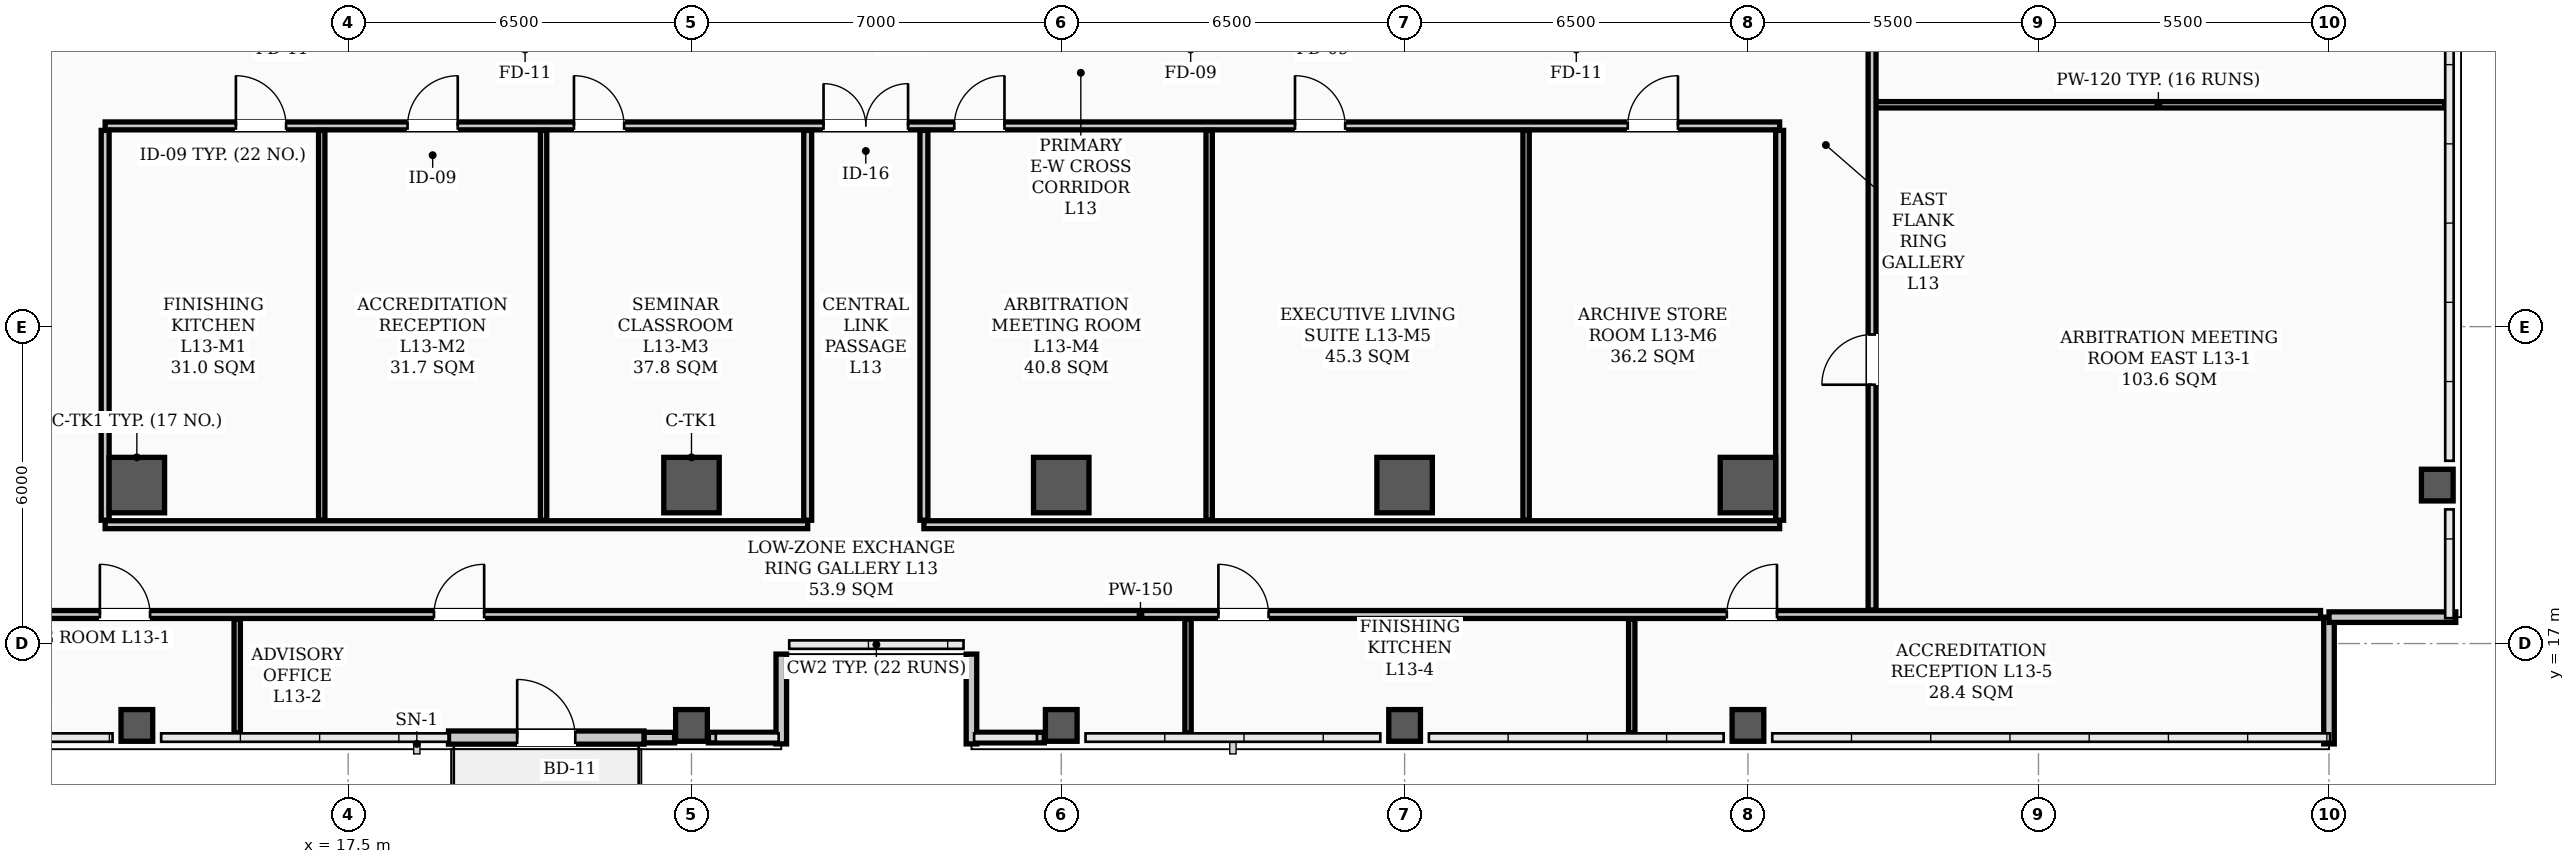
"""IFC4 building model, lengths in metres.
Left out: names, types, materials, properties, quantities, classifications, styles, units other than length and angle.
Written with IfcOpenShell. Run it as: python <this file> out.ifc"""

import sys

from ifc_helpers import new_model, si_unit, direction, frame, frame_2d, origin, origin_2d, place, context, subcontext, project, spatial, rectangle, hollow_rectangle, extrude, element, fill, save


model = new_model("IFC4")
c1 = context("Model", 3, precision=1e-05, world=origin(), true_north=direction((0.0, 1.0)))
c2 = subcontext(c1, "Body", "Model", "MODEL_VIEW")
j1 = project(units=[si_unit("LENGTHUNIT", "METRE"), si_unit("PLANEANGLEUNIT", "RADIAN")], contexts=[c1])
p1 = place(None, origin())
s1 = spatial("IfcSite", under=j1, at=p1, CompositionType="ELEMENT")
p2 = place(p1, origin())
s2 = spatial("IfcBuilding", under=s1, at=p2, CompositionType="ELEMENT")
p3 = place(p2, frame((0.0, 0.0, 53.8)))
s3 = spatial("IfcBuildingStorey", under=s2, at=p3, CompositionType="ELEMENT", Elevation=53.8)
for number, where, z_axis, x_axis in (
    (1, (13.5, 20.0, 0.0), (0.0, 0.0, 1.0), (1.0, 0.0, 0.0)),
    (2, (24.0, 20.0, 0.0), (0.0, 0.0, 1.0), (1.0, 0.0, 0.0)),
    (3, (31.0, 20.0, 0.0), (0.0, 0.0, 1.0), (1.0, 0.0, 0.0)),
    (4, (37.5, 20.0, 0.0), (0.0, 0.0, 1.0), (1.0, 0.0, 0.0)),
    (5, (44.0, 20.0, 0.0), (0.0, 0.0, 1.0), (1.0, 0.0, 0.0)),
):
    element("IfcColumn", number, at=place(p3, frame(where, z_axis=z_axis, x_axis=x_axis)), inside=s3, PredefinedType="COLUMN", context=c2, shape_type="SweptSolid", body=[
        extrude(hollow_rectangle(XDim=1.05, YDim=1.05, WallThickness=0.038, InnerFilletRadius=0.019, OuterFilletRadius=0.057, at=origin_2d()), origin(), (0.0, 0.0, 1.0), 3.9),
    ])
for number, where, z_axis, x_axis in (
    (6, (13.5, 15.45, 0.0), (0.0, 0.0, 1.0), (1.0, 0.0, 0.0)),
    (7, (24.0, 15.45, 0.0), (0.0, 0.0, 1.0), (1.0, 0.0, 0.0)),
    (8, (31.0, 15.45, 0.0), (0.0, 0.0, 1.0), (1.0, 0.0, 0.0)),
    (9, (37.5, 15.45, 0.0), (0.0, 0.0, 1.0), (1.0, 0.0, 0.0)),
    (10, (44.0, 15.45, 0.0), (0.0, 0.0, 1.0), (1.0, 0.0, 0.0)),
    (11, (57.05, 20.0, 0.0), (0.0, 0.0, 1.0), (1.0, 0.0, 0.0)),
):
    element("IfcColumn", number, at=place(p3, frame(where, z_axis=z_axis, x_axis=x_axis)), inside=s3, PredefinedType="COLUMN", context=c2, shape_type="SweptSolid", body=[
        extrude(hollow_rectangle(XDim=0.6, YDim=0.6, WallThickness=0.026, InnerFilletRadius=0.013, OuterFilletRadius=0.039, at=origin_2d()), origin(), (0.0, 0.0, 1.0), 3.9),
    ])
p4 = place(p3, frame((23.1, 15.22, 0.0), z_axis=(0.0, 0.0, 1.0), x_axis=(1.0, 0.0, 0.0)))
e12 = element("IfcWall", 12, at=p4, inside=s3, PredefinedType="PARAPET", context=c2, shape_type="SweptSolid", body=[
    extrude(rectangle(XDim=0.58, YDim=0.2, at=frame_2d((0.29, 0.0))), origin(), (0.0, 0.0, 1.0), 1.2),
])
for number, where, z_axis, x_axis in (
    (13, (24.32, 15.22, 0.0), (0.0, 0.0, 1.0), (1.0, 0.0, 0.0)),
    (14, (29.35, 15.22, 0.0), (0.0, 0.0, 1.0), (1.0, 0.0, 0.0)),
):
    element("IfcWall", number, at=place(p3, frame(where, z_axis=z_axis, x_axis=x_axis)), inside=s3, PredefinedType="PARAPET", context=c2, shape_type="SweptSolid", body=[
        extrude(rectangle(XDim=1.33, YDim=0.2, at=frame_2d((0.665, 0.0))), origin(), (0.0, 0.0, 1.0), 1.2),
    ])
for number, where, z_axis, x_axis in (
    (15, (55.0, 15.1, 0.0), (0.0, 0.0, 1.0), (0.0, 1.0, 0.0)),
    (16, (55.0, 17.5, 0.0), (0.0, 0.0, 1.0), (1.0, 0.0, 0.0)),
):
    element("IfcWall", number, at=place(p3, frame(where, z_axis=z_axis, x_axis=x_axis)), inside=s3, PredefinedType="PARAPET", context=c2, shape_type="SweptSolid", body=[
        extrude(rectangle(XDim=2.4, YDim=0.2, at=frame_2d((1.2, 0.0))), origin(), (0.0, 0.0, 1.0), 1.2),
    ])
for number, where, z_axis, x_axis in (
    (17, (25.7, 15.1, 0.0), (0.0, 0.0, 1.0), (0.0, 1.0, 0.0)),
    (18, (29.3, 16.8, 0.0), (0.0, 0.0, 1.0), (0.0, -1.0, 0.0)),
):
    element("IfcWall", number, at=place(p3, frame(where, z_axis=z_axis, x_axis=x_axis)), inside=s3, PredefinedType="PARAPET", context=c2, shape_type="SweptSolid", body=[
        extrude(rectangle(XDim=1.7, YDim=0.2, at=frame_2d((0.85, 0.0))), origin(), (0.0, 0.0, 1.0), 1.2),
    ])
p5 = place(p3, frame((19.4, 15.22, 0.0), z_axis=(0.0, 0.0, 1.0), x_axis=(1.0, 0.0, 0.0)))
e19 = element("IfcWall", 19, at=p5, inside=s3, PredefinedType="STANDARD", context=c2, shape_type="SweptSolid", body=[
    extrude(rectangle(XDim=3.7, YDim=0.25, at=frame_2d((1.85, 0.0))), origin(), (0.0, 0.0, 1.0), 3.18),
])
p6 = place(p5, frame((1.3, 0.0, 0.0)))
e20 = element("IfcOpeningElement", 20, at=p6, cuts=e19, PredefinedType="OPENING", context=c2, shape_type="SweptSolid", body=[
    extrude(rectangle(XDim=1.1, YDim=2.2, at=frame_2d((0.55, 1.1))), frame((0.0, 0.135, 0.0), z_axis=(0.0, -1.0, 0.0), x_axis=(1.0, 0.0, 0.0)), (0.0, 0.0, 1.0), 0.27),
])
p7 = place(p3, frame((12.9, 26.8, 0.0), z_axis=(0.0, 0.0, 1.0), x_axis=(1.0, 0.0, 0.0)))
e21 = element("IfcWall", 21, at=p7, inside=s3, PredefinedType="PARTITIONING", context=c2, shape_type="SweptSolid", body=[
    extrude(rectangle(XDim=31.7, YDim=0.15, at=frame_2d((15.85, 0.0))), origin(), (0.0, 0.0, 1.0), 3.1),
])
p8 = place(p7, frame((13.6, 0.0, 0.0)))
e22 = element("IfcOpeningElement", 22, at=p8, cuts=e21, PredefinedType="OPENING", context=c2, shape_type="SweptSolid", body=[
    extrude(rectangle(XDim=1.6, YDim=2.08, at=frame_2d((0.8, 1.04))), frame((0.0, 0.085, 0.0), z_axis=(0.0, -1.0, 0.0), x_axis=(1.0, 0.0, 0.0)), (0.0, 0.0, 1.0), 0.17),
])
p9 = place(p7, frame((2.475, 0.0, 0.0)))
e23 = element("IfcOpeningElement", 23, at=p9, cuts=e21, PredefinedType="OPENING", context=c2, shape_type="SweptSolid", body=[
    extrude(rectangle(XDim=0.95, YDim=2.08, at=frame_2d((0.475, 1.04))), frame((0.0, 0.085, 0.0), z_axis=(0.0, -1.0, 0.0), x_axis=(1.0, 0.0, 0.0)), (0.0, 0.0, 1.0), 0.17),
])
p10 = place(p7, frame((5.725, 0.0, 0.0)))
e24 = element("IfcOpeningElement", 24, at=p10, cuts=e21, PredefinedType="OPENING", context=c2, shape_type="SweptSolid", body=[
    extrude(rectangle(XDim=0.95, YDim=2.08, at=frame_2d((0.475, 1.04))), frame((0.0, 0.085, 0.0), z_axis=(0.0, -1.0, 0.0), x_axis=(1.0, 0.0, 0.0)), (0.0, 0.0, 1.0), 0.17),
])
p11 = place(p7, frame((8.875, 0.0, 0.0)))
e25 = element("IfcOpeningElement", 25, at=p11, cuts=e21, PredefinedType="OPENING", context=c2, shape_type="SweptSolid", body=[
    extrude(rectangle(XDim=0.95, YDim=2.08, at=frame_2d((0.475, 1.04))), frame((0.0, 0.085, 0.0), z_axis=(0.0, -1.0, 0.0), x_axis=(1.0, 0.0, 0.0)), (0.0, 0.0, 1.0), 0.17),
])
p12 = place(p7, frame((16.075, 0.0, 0.0)))
e26 = element("IfcOpeningElement", 26, at=p12, cuts=e21, PredefinedType="OPENING", context=c2, shape_type="SweptSolid", body=[
    extrude(rectangle(XDim=0.95, YDim=2.08, at=frame_2d((0.475, 1.04))), frame((0.0, 0.085, 0.0), z_axis=(0.0, -1.0, 0.0), x_axis=(1.0, 0.0, 0.0)), (0.0, 0.0, 1.0), 0.17),
])
p13 = place(p7, frame((22.525, 0.0, 0.0)))
e27 = element("IfcOpeningElement", 27, at=p13, cuts=e21, PredefinedType="OPENING", context=c2, shape_type="SweptSolid", body=[
    extrude(rectangle(XDim=0.95, YDim=2.08, at=frame_2d((0.475, 1.04))), frame((0.0, 0.085, 0.0), z_axis=(0.0, -1.0, 0.0), x_axis=(1.0, 0.0, 0.0)), (0.0, 0.0, 1.0), 0.17),
])
p14 = place(p7, frame((28.825, 0.0, 0.0)))
e28 = element("IfcOpeningElement", 28, at=p14, cuts=e21, PredefinedType="OPENING", context=c2, shape_type="SweptSolid", body=[
    extrude(rectangle(XDim=0.95, YDim=2.08, at=frame_2d((0.475, 1.04))), frame((0.0, 0.085, 0.0), z_axis=(0.0, -1.0, 0.0), x_axis=(1.0, 0.0, 0.0)), (0.0, 0.0, 1.0), 0.17),
])
p15 = place(p3, frame((10.16, 17.55, 0.0), z_axis=(0.0, 0.0, 1.0), x_axis=(1.0, 0.0, 0.0)))
e29 = element("IfcWall", 29, at=p15, inside=s3, PredefinedType="PARTITIONING", context=c2, shape_type="SweptSolid", body=[
    extrude(rectangle(XDim=44.68, YDim=0.15, at=frame_2d((22.34, 0.0))), origin(), (0.0, 0.0, 1.0), 3.1),
])
p16 = place(p15, frame((2.64, 0.0, 0.0)))
e30 = element("IfcOpeningElement", 30, at=p16, cuts=e29, PredefinedType="OPENING", context=c2, shape_type="SweptSolid", body=[
    extrude(rectangle(XDim=0.95, YDim=2.08, at=frame_2d((0.475, 1.04))), frame((0.0, 0.085, 0.0), z_axis=(0.0, -1.0, 0.0), x_axis=(1.0, 0.0, 0.0)), (0.0, 0.0, 1.0), 0.17),
])
p17 = place(p15, frame((8.965, 0.0, 0.0)))
e31 = element("IfcOpeningElement", 31, at=p17, cuts=e29, PredefinedType="OPENING", context=c2, shape_type="SweptSolid", body=[
    extrude(rectangle(XDim=0.95, YDim=2.08, at=frame_2d((0.475, 1.04))), frame((0.0, 0.085, 0.0), z_axis=(0.0, -1.0, 0.0), x_axis=(1.0, 0.0, 0.0)), (0.0, 0.0, 1.0), 0.17),
])
p18 = place(p15, frame((23.815, 0.0, 0.0)))
e32 = element("IfcOpeningElement", 32, at=p18, cuts=e29, PredefinedType="OPENING", context=c2, shape_type="SweptSolid", body=[
    extrude(rectangle(XDim=0.95, YDim=2.08, at=frame_2d((0.475, 1.04))), frame((0.0, 0.085, 0.0), z_axis=(0.0, -1.0, 0.0), x_axis=(1.0, 0.0, 0.0)), (0.0, 0.0, 1.0), 0.17),
])
p19 = place(p15, frame((33.44, 0.0, 0.0)))
e33 = element("IfcOpeningElement", 33, at=p19, cuts=e29, PredefinedType="OPENING", context=c2, shape_type="SweptSolid", body=[
    extrude(rectangle(XDim=0.95, YDim=2.08, at=frame_2d((0.475, 1.04))), frame((0.0, 0.085, 0.0), z_axis=(0.0, -1.0, 0.0), x_axis=(1.0, 0.0, 0.0)), (0.0, 0.0, 1.0), 0.17),
])
p20 = place(p3, frame((12.9, 19.25, 0.0), z_axis=(0.0, 0.0, 1.0), x_axis=(1.0, 0.0, 0.0)))
e34 = element("IfcWall", 34, at=p20, inside=s3, PredefinedType="PARTITIONING", context=c2, shape_type="SweptSolid", body=[
    extrude(rectangle(XDim=13.3, YDim=0.15, at=frame_2d((6.65, 0.0))), origin(), (0.0, 0.0, 1.0), 3.1),
])
p21 = place(p3, frame((28.4, 19.25, 0.0), z_axis=(0.0, 0.0, 1.0), x_axis=(1.0, 0.0, 0.0)))
e35 = element("IfcWall", 35, at=p21, inside=s3, PredefinedType="PARTITIONING", context=c2, shape_type="SweptSolid", body=[
    extrude(rectangle(XDim=16.2, YDim=0.15, at=frame_2d((8.1, 0.0))), origin(), (0.0, 0.0, 1.0), 3.1),
])
p22 = place(p3, frame((46.35, 27.2, 0.0), z_axis=(0.0, 0.0, 1.0), x_axis=(1.0, 0.0, 0.0)))
e36 = element("IfcWall", 36, at=p22, inside=s3, PredefinedType="PARTITIONING", context=c2, shape_type="SweptSolid", body=[
    extrude(rectangle(XDim=10.84, YDim=0.12, at=frame_2d((5.42, 0.0))), origin(), (0.0, 0.0, 1.0), 3.212),
])
for number, where, z_axis, x_axis in (
    (37, (26.2, 19.335, 0.0), (0.0, 0.0, 1.0), (0.0, 1.0, 0.0)),
    (38, (28.4, 19.335, 0.0), (0.0, 0.0, 1.0), (0.0, 1.0, 0.0)),
    (39, (12.9, 19.335, 0.0), (0.0, 0.0, 1.0), (0.0, 1.0, 0.0)),
):
    element("IfcWall", number, at=place(p3, frame(where, z_axis=z_axis, x_axis=x_axis)), inside=s3, PredefinedType="PARTITIONING", context=c2, shape_type="SweptSolid", body=[
        extrude(rectangle(XDim=7.38, YDim=0.15, at=frame_2d((3.69, 0.0))), origin(), (0.0, 0.0, 1.0), 3.0),
    ])
p23 = place(p3, frame((46.35, 17.635, 0.0), z_axis=(0.0, 0.0, 1.0), x_axis=(0.0, 1.0, 0.0)))
e40 = element("IfcWall", 40, at=p23, inside=s3, PredefinedType="PARTITIONING", context=c2, shape_type="SweptSolid", body=[
    extrude(rectangle(XDim=22.53, YDim=0.15, at=frame_2d((11.265, 0.0))), origin(), (0.0, 0.0, 1.0), 3.0),
])
p24 = place(p23, frame((4.265, 0.0, 0.0)))
e41 = element("IfcOpeningElement", 41, at=p24, cuts=e40, PredefinedType="OPENING", context=c2, shape_type="SweptSolid", body=[
    extrude(rectangle(XDim=0.95, YDim=2.08, at=frame_2d((0.475, 1.04))), frame((0.0, 0.085, 0.0), z_axis=(0.0, -1.0, 0.0), x_axis=(1.0, 0.0, 0.0)), (0.0, 0.0, 1.0), 0.17),
])
p25 = place(p23, frame((12.39, 0.0, 0.0)))
e42 = element("IfcOpeningElement", 42, at=p25, cuts=e40, PredefinedType="OPENING", context=c2, shape_type="SweptSolid", body=[
    extrude(rectangle(XDim=0.95, YDim=2.08, at=frame_2d((0.475, 1.04))), frame((0.0, 0.085, 0.0), z_axis=(0.0, -1.0, 0.0), x_axis=(1.0, 0.0, 0.0)), (0.0, 0.0, 1.0), 0.17),
])
p26 = place(p23, frame((18.915, 0.0, 0.0)))
e43 = element("IfcOpeningElement", 43, at=p26, cuts=e40, PredefinedType="OPENING", context=c2, shape_type="SweptSolid", body=[
    extrude(rectangle(XDim=0.95, YDim=2.08, at=frame_2d((0.475, 1.04))), frame((0.0, 0.085, 0.0), z_axis=(0.0, -1.0, 0.0), x_axis=(1.0, 0.0, 0.0)), (0.0, 0.0, 1.0), 0.17),
])
p27 = place(p3, frame((44.6, 19.335, 0.0), z_axis=(0.0, 0.0, 1.0), x_axis=(0.0, 1.0, 0.0)))
e44 = element("IfcWall", 44, at=p27, inside=s3, PredefinedType="PARTITIONING", context=c2, shape_type="SweptSolid", body=[
    extrude(rectangle(XDim=7.38, YDim=0.15, at=frame_2d((3.69, 0.0))), origin(), (0.0, 0.0, 1.0), 3.0),
])
for number, where, z_axis, x_axis in (
    (45, (15.4, 15.31, 0.0), (0.0, 0.0, 1.0), (0.0, 1.0, 0.0)),
    (46, (33.4, 15.31, 0.0), (0.0, 0.0, 1.0), (0.0, 1.0, 0.0)),
    (47, (41.8, 15.31, 0.0), (0.0, 0.0, 1.0), (0.0, 1.0, 0.0)),
):
    element("IfcWall", number, at=place(p3, frame(where, z_axis=z_axis, x_axis=x_axis)), inside=s3, PredefinedType="PARTITIONING", context=c2, shape_type="SweptSolid", body=[
        extrude(rectangle(XDim=2.155, YDim=0.12, at=frame_2d((1.078, 0.0))), origin(), (0.0, 0.0, 1.0), 3.212),
    ])
for number, where, z_axis, x_axis in (
    (48, (17.0, 19.335, 0.0), (0.0, 0.0, 1.0), (0.0, 1.0, 0.0)),
    (49, (21.2, 19.335, 0.0), (0.0, 0.0, 1.0), (0.0, 1.0, 0.0)),
    (50, (33.8, 19.335, 0.0), (0.0, 0.0, 1.0), (0.0, 1.0, 0.0)),
    (51, (39.8, 19.335, 0.0), (0.0, 0.0, 1.0), (0.0, 1.0, 0.0)),
):
    element("IfcWall", number, at=place(p3, frame(where, z_axis=z_axis, x_axis=x_axis)), inside=s3, PredefinedType="PARTITIONING", context=c2, shape_type="SweptSolid", body=[
        extrude(rectangle(XDim=7.38, YDim=0.12, at=frame_2d((3.69, 0.0))), origin(), (0.0, 0.0, 1.0), 3.0),
    ])
p28 = place(p6, origin())
e52 = element("IfcDoor", 52, at=p28, inside=s3, OperationType="SINGLE_SWING_LEFT", PredefinedType="DOOR", context=c2, shape_type="SweptSolid", body=[
    extrude(rectangle(XDim=1.1, YDim=2.2, at=frame_2d((0.55, 1.1))), frame((0.0, 0.025, 0.0), z_axis=(0.0, -1.0, 0.0), x_axis=(1.0, 0.0, 0.0)), (0.0, 0.0, 1.0), 0.05),
])
fill(e20, e52)
p29 = place(p8, origin())
e53 = element("IfcDoor", 53, at=p29, inside=s3, OperationType="DOUBLE_DOOR_SINGLE_SWING", PredefinedType="DOOR", context=c2, shape_type="SweptSolid", body=[
    extrude(rectangle(XDim=1.6, YDim=2.08, at=frame_2d((0.8, 1.04))), frame((0.0, 0.025, 0.0), z_axis=(0.0, -1.0, 0.0), x_axis=(1.0, 0.0, 0.0)), (0.0, 0.0, 1.0), 0.05),
])
fill(e22, e53)
p30 = place(p16, origin())
e54 = element("IfcDoor", 54, at=p30, inside=s3, OperationType="SINGLE_SWING_LEFT", PredefinedType="DOOR", context=c2, shape_type="SweptSolid", body=[
    extrude(rectangle(XDim=0.95, YDim=2.08, at=frame_2d((0.475, 1.04))), frame((0.0, 0.025, 0.0), z_axis=(0.0, -1.0, 0.0), x_axis=(1.0, 0.0, 0.0)), (0.0, 0.0, 1.0), 0.05),
])
fill(e30, e54)
p31 = place(p17, origin())
e55 = element("IfcDoor", 55, at=p31, inside=s3, OperationType="SINGLE_SWING_RIGHT", PredefinedType="DOOR", context=c2, shape_type="SweptSolid", body=[
    extrude(rectangle(XDim=0.95, YDim=2.08, at=frame_2d((0.475, 1.04))), frame((0.0, 0.025, 0.0), z_axis=(0.0, -1.0, 0.0), x_axis=(1.0, 0.0, 0.0)), (0.0, 0.0, 1.0), 0.05),
])
fill(e31, e55)
p32 = place(p18, origin())
e56 = element("IfcDoor", 56, at=p32, inside=s3, OperationType="SINGLE_SWING_LEFT", PredefinedType="DOOR", context=c2, shape_type="SweptSolid", body=[
    extrude(rectangle(XDim=0.95, YDim=2.08, at=frame_2d((0.475, 1.04))), frame((0.0, 0.025, 0.0), z_axis=(0.0, -1.0, 0.0), x_axis=(1.0, 0.0, 0.0)), (0.0, 0.0, 1.0), 0.05),
])
fill(e32, e56)
p33 = place(p19, origin())
e57 = element("IfcDoor", 57, at=p33, inside=s3, OperationType="SINGLE_SWING_RIGHT", PredefinedType="DOOR", context=c2, shape_type="SweptSolid", body=[
    extrude(rectangle(XDim=0.95, YDim=2.08, at=frame_2d((0.475, 1.04))), frame((0.0, 0.025, 0.0), z_axis=(0.0, -1.0, 0.0), x_axis=(1.0, 0.0, 0.0)), (0.0, 0.0, 1.0), 0.05),
])
fill(e33, e57)
p34 = place(p9, origin())
e58 = element("IfcDoor", 58, at=p34, inside=s3, OperationType="SINGLE_SWING_LEFT", PredefinedType="DOOR", context=c2, shape_type="SweptSolid", body=[
    extrude(rectangle(XDim=0.95, YDim=2.08, at=frame_2d((0.475, 1.04))), frame((0.0, 0.025, 0.0), z_axis=(0.0, -1.0, 0.0), x_axis=(1.0, 0.0, 0.0)), (0.0, 0.0, 1.0), 0.05),
])
fill(e23, e58)
p35 = place(p10, origin())
e59 = element("IfcDoor", 59, at=p35, inside=s3, OperationType="SINGLE_SWING_RIGHT", PredefinedType="DOOR", context=c2, shape_type="SweptSolid", body=[
    extrude(rectangle(XDim=0.95, YDim=2.08, at=frame_2d((0.475, 1.04))), frame((0.0, 0.025, 0.0), z_axis=(0.0, -1.0, 0.0), x_axis=(1.0, 0.0, 0.0)), (0.0, 0.0, 1.0), 0.05),
])
fill(e24, e59)
p36 = place(p11, origin())
e60 = element("IfcDoor", 60, at=p36, inside=s3, OperationType="SINGLE_SWING_LEFT", PredefinedType="DOOR", context=c2, shape_type="SweptSolid", body=[
    extrude(rectangle(XDim=0.95, YDim=2.08, at=frame_2d((0.475, 1.04))), frame((0.0, 0.025, 0.0), z_axis=(0.0, -1.0, 0.0), x_axis=(1.0, 0.0, 0.0)), (0.0, 0.0, 1.0), 0.05),
])
fill(e25, e60)
p37 = place(p12, origin())
e61 = element("IfcDoor", 61, at=p37, inside=s3, OperationType="SINGLE_SWING_RIGHT", PredefinedType="DOOR", context=c2, shape_type="SweptSolid", body=[
    extrude(rectangle(XDim=0.95, YDim=2.08, at=frame_2d((0.475, 1.04))), frame((0.0, 0.025, 0.0), z_axis=(0.0, -1.0, 0.0), x_axis=(1.0, 0.0, 0.0)), (0.0, 0.0, 1.0), 0.05),
])
fill(e26, e61)
p38 = place(p13, origin())
e62 = element("IfcDoor", 62, at=p38, inside=s3, OperationType="SINGLE_SWING_LEFT", PredefinedType="DOOR", context=c2, shape_type="SweptSolid", body=[
    extrude(rectangle(XDim=0.95, YDim=2.08, at=frame_2d((0.475, 1.04))), frame((0.0, 0.025, 0.0), z_axis=(0.0, -1.0, 0.0), x_axis=(1.0, 0.0, 0.0)), (0.0, 0.0, 1.0), 0.05),
])
fill(e27, e62)
p39 = place(p14, origin())
e63 = element("IfcDoor", 63, at=p39, inside=s3, OperationType="SINGLE_SWING_RIGHT", PredefinedType="DOOR", context=c2, shape_type="SweptSolid", body=[
    extrude(rectangle(XDim=0.95, YDim=2.08, at=frame_2d((0.475, 1.04))), frame((0.0, 0.025, 0.0), z_axis=(0.0, -1.0, 0.0), x_axis=(1.0, 0.0, 0.0)), (0.0, 0.0, 1.0), 0.05),
])
fill(e28, e63)
p40 = place(p24, origin())
e64 = element("IfcDoor", 64, at=p40, inside=s3, OperationType="SINGLE_SWING_LEFT", PredefinedType="DOOR", context=c2, shape_type="SweptSolid", body=[
    extrude(rectangle(XDim=0.95, YDim=2.08, at=frame_2d((0.475, 1.04))), frame((0.0, 0.025, 0.0), z_axis=(0.0, -1.0, 0.0), x_axis=(1.0, 0.0, 0.0)), (0.0, 0.0, 1.0), 0.05),
])
fill(e41, e64)
save(model, sys.argv[1])
